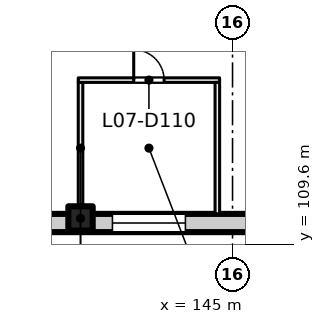
"""IFC4 building model, lengths in metres.
Left out: names, types, materials, properties, quantities, classifications, styles, units other than length and angle.
Written with IfcOpenShell. Run it as: python <this file> out.ifc"""

import sys

from ifc_helpers import new_model, si_unit, direction, frame, frame_2d, origin, origin_2d, place, context, subcontext, project, spatial, rectangle, extrude, element, fill, save


model = new_model("IFC4")
c1 = context("Model", 3, precision=1e-05, world=origin(), true_north=direction((0.0, 1.0)))
c2 = subcontext(c1, "Body", "Model", "MODEL_VIEW")
j1 = project(units=[si_unit("LENGTHUNIT", "METRE"), si_unit("PLANEANGLEUNIT", "RADIAN")], contexts=[c1])
p1 = place(None, origin())
s1 = spatial("IfcSite", under=j1, at=p1, CompositionType="ELEMENT")
p2 = place(p1, origin())
s2 = spatial("IfcBuilding", under=s1, at=p2, CompositionType="ELEMENT")
p3 = place(p2, frame((0.0, 0.0, 35.5)))
s3 = spatial("IfcBuildingStorey", under=s2, at=p3, CompositionType="ELEMENT", Elevation=35.5)
p4 = place(p3, frame((140.0, 110.45, 0.0), z_axis=(0.0, 0.0, 1.0), x_axis=(1.0, 0.0, 0.0)))
e1 = element("IfcColumn", 1, at=p4, inside=s3, PredefinedType="COLUMN", context=c2, shape_type="SweptSolid", body=[
    extrude(rectangle(XDim=0.8, YDim=0.8, at=origin_2d()), origin(), (0.0, 0.0, 1.0), 4.0),
])
p5 = place(p3, frame((162.93, 110.3, 0.0), z_axis=(0.0, 0.0, 1.0), x_axis=(-1.0, 0.0, 0.0)))
e2 = element("IfcWall", 2, at=p5, inside=s3, PredefinedType="SOLIDWALL", context=c2, shape_type="SweptSolid", body=[
    extrude(rectangle(XDim=31.93, YDim=0.6, at=frame_2d((15.965, 0.0))), origin(), (0.0, 0.0, 1.0), 3.625),
])
p6 = place(p5, frame((1.48, 0.0, 0.9)))
e3 = element("IfcOpeningElement", 3, at=p6, cuts=e2, PredefinedType="OPENING", context=c2, shape_type="SweptSolid", body=[
    extrude(rectangle(XDim=2.4, YDim=2.4, at=frame_2d((1.2, 1.2))), frame((0.0, 0.31, 0.0), z_axis=(0.0, -1.0, 0.0), x_axis=(1.0, 0.0, 0.0)), (0.0, 0.0, 1.0), 0.62),
])
p7 = place(p5, frame((5.98, 0.0, 0.9)))
e4 = element("IfcOpeningElement", 4, at=p7, cuts=e2, PredefinedType="OPENING", context=c2, shape_type="SweptSolid", body=[
    extrude(rectangle(XDim=2.4, YDim=2.4, at=frame_2d((1.2, 1.2))), frame((0.0, 0.31, 0.0), z_axis=(0.0, -1.0, 0.0), x_axis=(1.0, 0.0, 0.0)), (0.0, 0.0, 1.0), 0.62),
])
p8 = place(p5, frame((10.48, 0.0, 0.9)))
e5 = element("IfcOpeningElement", 5, at=p8, cuts=e2, PredefinedType="OPENING", context=c2, shape_type="SweptSolid", body=[
    extrude(rectangle(XDim=2.4, YDim=2.4, at=frame_2d((1.2, 1.2))), frame((0.0, 0.31, 0.0), z_axis=(0.0, -1.0, 0.0), x_axis=(1.0, 0.0, 0.0)), (0.0, 0.0, 1.0), 0.62),
])
p9 = place(p5, frame((14.98, 0.0, 0.9)))
e6 = element("IfcOpeningElement", 6, at=p9, cuts=e2, PredefinedType="OPENING", context=c2, shape_type="SweptSolid", body=[
    extrude(rectangle(XDim=2.4, YDim=2.4, at=frame_2d((1.2, 1.2))), frame((0.0, 0.31, 0.0), z_axis=(0.0, -1.0, 0.0), x_axis=(1.0, 0.0, 0.0)), (0.0, 0.0, 1.0), 0.62),
])
p10 = place(p5, frame((19.48, 0.0, 0.9)))
e7 = element("IfcOpeningElement", 7, at=p10, cuts=e2, PredefinedType="OPENING", context=c2, shape_type="SweptSolid", body=[
    extrude(rectangle(XDim=2.4, YDim=2.4, at=frame_2d((1.2, 1.2))), frame((0.0, 0.31, 0.0), z_axis=(0.0, -1.0, 0.0), x_axis=(1.0, 0.0, 0.0)), (0.0, 0.0, 1.0), 0.62),
])
p11 = place(p5, frame((23.98, 0.0, 0.9)))
e8 = element("IfcOpeningElement", 8, at=p11, cuts=e2, PredefinedType="OPENING", context=c2, shape_type="SweptSolid", body=[
    extrude(rectangle(XDim=2.4, YDim=2.4, at=frame_2d((1.2, 1.2))), frame((0.0, 0.31, 0.0), z_axis=(0.0, -1.0, 0.0), x_axis=(1.0, 0.0, 0.0)), (0.0, 0.0, 1.0), 0.62),
])
p12 = place(p5, frame((28.48, 0.0, 0.9)))
e9 = element("IfcOpeningElement", 9, at=p12, cuts=e2, PredefinedType="OPENING", context=c2, shape_type="SweptSolid", body=[
    extrude(rectangle(XDim=2.4, YDim=2.4, at=frame_2d((1.2, 1.2))), frame((0.0, 0.31, 0.0), z_axis=(0.0, -1.0, 0.0), x_axis=(1.0, 0.0, 0.0)), (0.0, 0.0, 1.0), 0.62),
])
p13 = place(p3, frame((140.0, 110.6, 0.0), z_axis=(0.0, 0.0, 1.0), x_axis=(0.0, 1.0, 0.0)))
e10 = element("IfcWall", 10, at=p13, inside=s3, PredefinedType="PARTITIONING", context=c2, shape_type="SweptSolid", body=[
    extrude(rectangle(XDim=4.325, YDim=0.15, at=frame_2d((2.163, 0.0))), origin(), (0.0, 0.0, 1.0), 3.625),
])
p14 = place(p3, frame((139.925, 115.0, 0.0), z_axis=(0.0, 0.0, 1.0), x_axis=(1.0, 0.0, 0.0)))
e11 = element("IfcWall", 11, at=p14, inside=s3, PredefinedType="PARTITIONING", context=c2, shape_type="SweptSolid", body=[
    extrude(rectangle(XDim=4.65, YDim=0.15, at=frame_2d((2.325, 0.0))), origin(), (0.0, 0.0, 1.0), 3.625),
])
p15 = place(p14, frame((1.825, 0.0, 0.0)))
e12 = element("IfcOpeningElement", 12, at=p15, cuts=e11, PredefinedType="OPENING", context=c2, shape_type="SweptSolid", body=[
    extrude(rectangle(XDim=1.0, YDim=2.1, at=frame_2d((0.5, 1.05))), frame((0.0, 0.085, 0.0), z_axis=(0.0, -1.0, 0.0), x_axis=(1.0, 0.0, 0.0)), (0.0, 0.0, 1.0), 0.17),
])
p16 = place(p3, frame((144.5, 114.925, 0.0), z_axis=(0.0, 0.0, 1.0), x_axis=(0.0, -1.0, 0.0)))
e13 = element("IfcWall", 13, at=p16, inside=s3, PredefinedType="PARTITIONING", context=c2, shape_type="SweptSolid", body=[
    extrude(rectangle(XDim=4.325, YDim=0.15, at=frame_2d((2.163, 0.0))), origin(), (0.0, 0.0, 1.0), 3.625),
])
p17 = place(p10, origin())
e14 = element("IfcWindow", 14, at=p17, inside=s3, PartitioningType="SINGLE_PANEL", PredefinedType="WINDOW", context=c2, shape_type="SweptSolid", body=[
    extrude(rectangle(XDim=2.4, YDim=2.4, at=frame_2d((1.2, 1.2))), frame((0.0, 0.03, 0.0), z_axis=(0.0, -1.0, 0.0), x_axis=(1.0, 0.0, 0.0)), (0.0, 0.0, 1.0), 0.06),
])
fill(e7, e14)
p18 = place(p15, origin())
e15 = element("IfcDoor", 15, at=p18, inside=s3, OperationType="SINGLE_SWING_LEFT", PredefinedType="DOOR", context=c2, shape_type="SweptSolid", body=[
    extrude(rectangle(XDim=1.0, YDim=2.1, at=frame_2d((0.5, 1.05))), frame((0.0, 0.025, 0.0), z_axis=(0.0, -1.0, 0.0), x_axis=(1.0, 0.0, 0.0)), (0.0, 0.0, 1.0), 0.05),
])
fill(e12, e15)
save(model, sys.argv[1])
